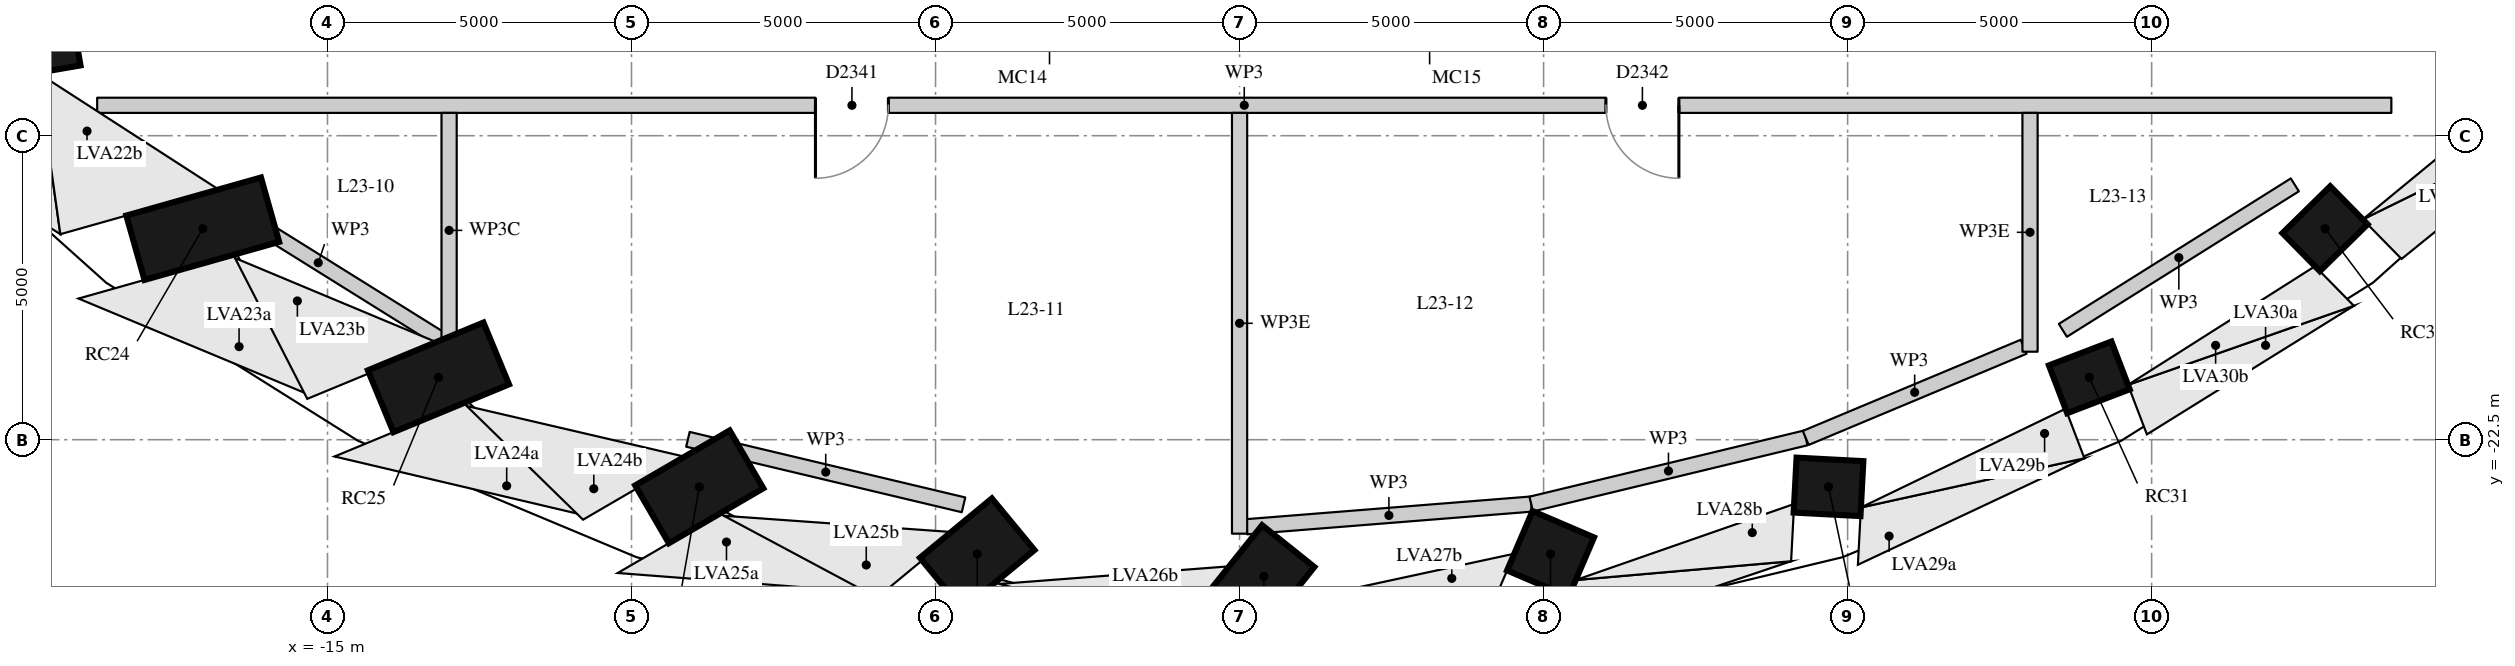
"""IFC4 building model, lengths in metres.
Left out: names, types, materials, properties, quantities, classifications, styles, units other than length and angle.
Written with IfcOpenShell. Run it as: python <this file> out.ifc"""

import sys

from ifc_helpers import new_model, si_unit, direction, frame, frame_2d, origin, origin_2d, place, context, subcontext, project, spatial, rectangle, extrude, element, fill, save


model = new_model("IFC4")
c1 = context("Model", 3, precision=1e-05, world=origin(), true_north=direction((0.0, 1.0)))
c2 = subcontext(c1, "Body", "Model", "MODEL_VIEW")
j1 = project(units=[si_unit("LENGTHUNIT", "METRE"), si_unit("PLANEANGLEUNIT", "RADIAN")], contexts=[c1])
p1 = place(None, origin())
s1 = spatial("IfcSite", under=j1, at=p1, CompositionType="ELEMENT")
p2 = place(p1, origin())
s2 = spatial("IfcBuilding", under=s1, at=p2, CompositionType="ELEMENT")
p3 = place(p2, frame((0.0, 0.0, 84.4)))
s3 = spatial("IfcBuildingStorey", under=s2, at=p3, CompositionType="ELEMENT", Elevation=84.4)
p4 = place(p3, frame((-21.641, -16.23, 0.427), z_axis=(0.560538019427, 0.096634992544, 0.822471158761), x_axis=(-0.81051482165, -0.139730207465, 0.56880681519)))
e1 = element("IfcColumn", 1, at=p4, inside=s3, PredefinedType="COLUMN", context=c2, shape_type="SweptSolid", body=[
    extrude(rectangle(XDim=1.5, YDim=1.1, at=origin_2d()), origin(), (0.0, 0.0, 1.0), 4.434),
])
p5 = place(p3, frame((-18.159, -19.343, 0.396), z_axis=(0.5072596279, 0.143301264382, 0.849795515127), x_axis=(-0.817789297004, -0.23102615271, 0.527112495081)))
e2 = element("IfcColumn", 2, at=p5, inside=s3, PredefinedType="COLUMN", context=c2, shape_type="SweptSolid", body=[
    extrude(rectangle(XDim=1.5, YDim=1.1, at=origin_2d()), origin(), (0.0, 0.0, 1.0), 4.365),
])
p6 = place(p3, frame((-14.125, -21.867, 0.358), z_axis=(0.441181665718, 0.182436725813, 0.878678313667), x_axis=(-0.811992342691, -0.335773754662, 0.477414307589)))
e3 = element("IfcColumn", 3, at=p6, inside=s3, PredefinedType="COLUMN", context=c2, shape_type="SweptSolid", body=[
    extrude(rectangle(XDim=1.5, YDim=1.1, at=origin_2d()), origin(), (0.0, 0.0, 1.0), 4.306),
])
p7 = place(p3, frame((-9.662, -23.727, 0.316), z_axis=(0.363996966991, 0.211849783745, 0.906987253024), x_axis=(-0.783887642181, -0.456230250623, 0.421158073473)))
e4 = element("IfcColumn", 4, at=p7, inside=s3, PredefinedType="COLUMN", context=c2, shape_type="SweptSolid", body=[
    extrude(rectangle(XDim=1.5, YDim=1.1, at=origin_2d()), origin(), (0.0, 0.0, 1.0), 4.265),
])
p8 = place(p3, frame((-4.906, -24.866, 0.271), z_axis=(0.278442580156, 0.229897746929, 0.93253244207), x_axis=(-0.719099036727, -0.593728330882, 0.361086200909)))
e5 = element("IfcColumn", 5, at=p8, inside=s3, PredefinedType="COLUMN", context=c2, shape_type="SweptSolid", body=[
    extrude(rectangle(XDim=1.5, YDim=1.1, at=origin_2d()), origin(), (0.0, 0.0, 1.0), 4.245),
])
p9 = place(p3, frame((0.0, -25.25, 0.226), z_axis=(0.188451888787, 0.235550484123, 0.953415887764), x_axis=(-0.59561634852, -0.744474996502, 0.301658987863)))
e6 = element("IfcColumn", 6, at=p9, inside=s3, PredefinedType="COLUMN", context=c2, shape_type="SweptSolid", body=[
    extrude(rectangle(XDim=1.5, YDim=1.1, at=origin_2d()), origin(), (0.0, 0.0, 1.0), 4.245),
])
p10 = place(p3, frame((4.906, -24.866, 0.187), z_axis=(0.09810110987, 0.229036294481, 0.968461949719), x_axis=(-0.381307677964, -0.890237610292, 0.249161497723)))
e7 = element("IfcColumn", 7, at=p10, inside=s3, PredefinedType="COLUMN", context=c2, shape_type="SweptSolid", body=[
    extrude(rectangle(XDim=1.5, YDim=1.1, at=origin_2d()), origin(), (0.0, 0.0, 1.0), 4.26),
])
p11 = place(p3, frame((9.662, -23.727, 0.159), z_axis=(0.011124254509, 0.211132645836, 0.977394115403), x_axis=(-0.051426061466, -0.976040274285, 0.211425502662)))
e8 = element("IfcColumn", 8, at=p11, inside=s3, PredefinedType="COLUMN", context=c2, shape_type="SweptSolid", body=[
    extrude(rectangle(XDim=1.5, YDim=1.1, at=origin_2d()), origin(), (0.0, 0.0, 1.0), 4.28),
])
p12 = place(p3, frame((14.125, -21.867, 0.147), z_axis=(-0.069956640927, 0.18317369447, 0.980588326488), x_axis=(0.34985418247, -0.916054319925, 0.196077877272)))
e9 = element("IfcColumn", 9, at=p12, inside=s3, PredefinedType="COLUMN", context=c2, shape_type="SweptSolid", body=[
    extrude(rectangle(XDim=1.5, YDim=1.1, at=origin_2d()), origin(), (0.0, 0.0, 1.0), 4.289),
])
p13 = place(p3, frame((18.159, -19.343, 0.154), z_axis=(-0.143335748736, 0.14601438897, 0.978843532618), x_axis=(0.685710012277, -0.698524473739, 0.204610211505)))
e10 = element("IfcColumn", 10, at=p13, inside=s3, PredefinedType="COLUMN", context=c2, shape_type="SweptSolid", body=[
    extrude(rectangle(XDim=1.5, YDim=1.1, at=origin_2d()), origin(), (0.0, 0.0, 1.0), 4.284),
])
p14 = place(p3, frame((-17.166, -18.333, 0.0), z_axis=(0.0, 0.0, 1.0), x_axis=(0.848477460484, -0.529231517438, 0.0)))
e11 = element("IfcWall", 11, at=p14, inside=s3, PredefinedType="PARTITIONING", context=c2, shape_type="SweptSolid", body=[
    extrude(rectangle(XDim=4.748, YDim=0.25, at=frame_2d((2.374, 0.0))), origin(), (0.0, 0.0, 1.0), 4.22),
])
p15 = place(p3, frame((-9.073, -22.493, 0.0), z_axis=(0.0, 0.0, 1.0), x_axis=(0.972870834261, -0.231348956871, 0.0)))
e12 = element("IfcWall", 12, at=p15, inside=s3, PredefinedType="PARTITIONING", context=c2, shape_type="SweptSolid", body=[
    extrude(rectangle(XDim=4.659, YDim=0.25, at=frame_2d((2.33, 0.0))), origin(), (0.0, 0.0, 1.0), 4.22),
])
p16 = place(p3, frame((0.116, -23.932, 0.0), z_axis=(0.0, 0.0, 1.0), x_axis=(0.996843157294, 0.07939596814, 0.0)))
e13 = element("IfcWall", 13, at=p16, inside=s3, PredefinedType="PARTITIONING", context=c2, shape_type="SweptSolid", body=[
    extrude(rectangle(XDim=4.696, YDim=0.25, at=frame_2d((2.348, 0.0))), origin(), (0.0, 0.0, 1.0), 4.22),
])
p17 = place(p3, frame((4.796, -23.559, 0.0), z_axis=(0.0, 0.0, 1.0), x_axis=(0.972161129626, 0.234313333049, 0.0)))
e14 = element("IfcWall", 14, at=p17, inside=s3, PredefinedType="PARTITIONING", context=c2, shape_type="SweptSolid", body=[
    extrude(rectangle(XDim=4.644, YDim=0.25, at=frame_2d((2.322, 0.0))), origin(), (0.0, 0.0, 1.0), 4.22),
])
p18 = place(p3, frame((9.311, -22.471, 0.0), z_axis=(0.0, 0.0, 1.0), x_axis=(0.922523740544, 0.385940342713, 0.0)))
e15 = element("IfcWall", 15, at=p18, inside=s3, PredefinedType="PARTITIONING", context=c2, shape_type="SweptSolid", body=[
    extrude(rectangle(XDim=3.885, YDim=0.25, at=frame_2d((1.942, 0.0))), origin(), (0.0, 0.0, 1.0), 4.22),
])
p19 = place(p3, frame((13.54, -20.702, 0.0), z_axis=(0.0, 0.0, 1.0), x_axis=(0.847150506273, 0.531353008574, 0.0)))
e16 = element("IfcWall", 16, at=p19, inside=s3, PredefinedType="PARTITIONING", context=c2, shape_type="SweptSolid", body=[
    extrude(rectangle(XDim=4.503, YDim=0.25, at=frame_2d((2.251, 0.0))), origin(), (0.0, 0.0, 1.0), 4.22),
])
p20 = place(p3, frame((-18.788, -17.0, 0.0), z_axis=(0.0, 0.0, 1.0), x_axis=(1.0, 0.0, 0.0)))
e17 = element("IfcWall", 17, at=p20, inside=s3, PredefinedType="PARTITIONING", context=c2, shape_type="SweptSolid", body=[
    extrude(rectangle(XDim=37.73, YDim=0.25, at=frame_2d((18.865, 0.0))), origin(), (0.0, 0.0, 1.0), 4.22),
])
p21 = place(p20, frame((11.813, 0.0, 0.0)))
e18 = element("IfcOpeningElement", 18, at=p21, cuts=e17, PredefinedType="OPENING", context=c2, shape_type="SweptSolid", body=[
    extrude(rectangle(XDim=1.2, YDim=2.1, at=frame_2d((0.6, 1.05))), frame((0.0, 0.135, 0.0), z_axis=(0.0, -1.0, 0.0), x_axis=(1.0, 0.0, 0.0)), (0.0, 0.0, 1.0), 0.27),
])
p22 = place(p20, frame((24.813, 0.0, 0.0)))
e19 = element("IfcOpeningElement", 19, at=p22, cuts=e17, PredefinedType="OPENING", context=c2, shape_type="SweptSolid", body=[
    extrude(rectangle(XDim=1.2, YDim=2.1, at=frame_2d((0.6, 1.05))), frame((0.0, 0.135, 0.0), z_axis=(0.0, -1.0, 0.0), x_axis=(1.0, 0.0, 0.0)), (0.0, 0.0, 1.0), 0.27),
])
p23 = place(p3, frame((-13.0, -20.989, 0.0), z_axis=(0.0, 0.0, 1.0), x_axis=(0.0, 1.0, 0.0)))
e20 = element("IfcWall", 20, at=p23, inside=s3, PredefinedType="PARTITIONING", context=c2, shape_type="SweptSolid", body=[
    extrude(rectangle(XDim=3.864, YDim=0.25, at=frame_2d((1.932, 0.0))), origin(), (0.0, 0.0, 1.0), 3.77),
])
p24 = place(p3, frame((0.0, -24.045, 0.0), z_axis=(0.0, 0.0, 1.0), x_axis=(0.0, 1.0, 0.0)))
e21 = element("IfcWall", 21, at=p24, inside=s3, PredefinedType="PARTITIONING", context=c2, shape_type="SweptSolid", body=[
    extrude(rectangle(XDim=6.92, YDim=0.25, at=frame_2d((3.46, 0.0))), origin(), (0.0, 0.0, 1.0), 3.67),
])
p25 = place(p3, frame((13.0, -21.052, 0.0), z_axis=(0.0, 0.0, 1.0), x_axis=(0.0, 1.0, 0.0)))
e22 = element("IfcWall", 22, at=p25, inside=s3, PredefinedType="PARTITIONING", context=c2, shape_type="SweptSolid", body=[
    extrude(rectangle(XDim=3.927, YDim=0.25, at=frame_2d((1.964, 0.0))), origin(), (0.0, 0.0, 1.0), 3.67),
])
p26 = place(p21, origin())
e23 = element("IfcDoor", 23, at=p26, inside=s3, OperationType="SINGLE_SWING_RIGHT", PredefinedType="DOOR", context=c2, shape_type="SweptSolid", body=[
    extrude(rectangle(XDim=1.2, YDim=2.1, at=frame_2d((0.6, 1.05))), frame((0.0, 0.025, 0.0), z_axis=(0.0, -1.0, 0.0), x_axis=(1.0, 0.0, 0.0)), (0.0, 0.0, 1.0), 0.05),
])
fill(e18, e23)
p27 = place(p22, origin())
e24 = element("IfcDoor", 24, at=p27, inside=s3, OperationType="SINGLE_SWING_LEFT", PredefinedType="DOOR", context=c2, shape_type="SweptSolid", body=[
    extrude(rectangle(XDim=1.2, YDim=2.1, at=frame_2d((0.6, 1.05))), frame((0.0, 0.025, 0.0), z_axis=(0.0, -1.0, 0.0), x_axis=(1.0, 0.0, 0.0)), (0.0, 0.0, 1.0), 0.05),
])
fill(e19, e24)
save(model, sys.argv[1])
